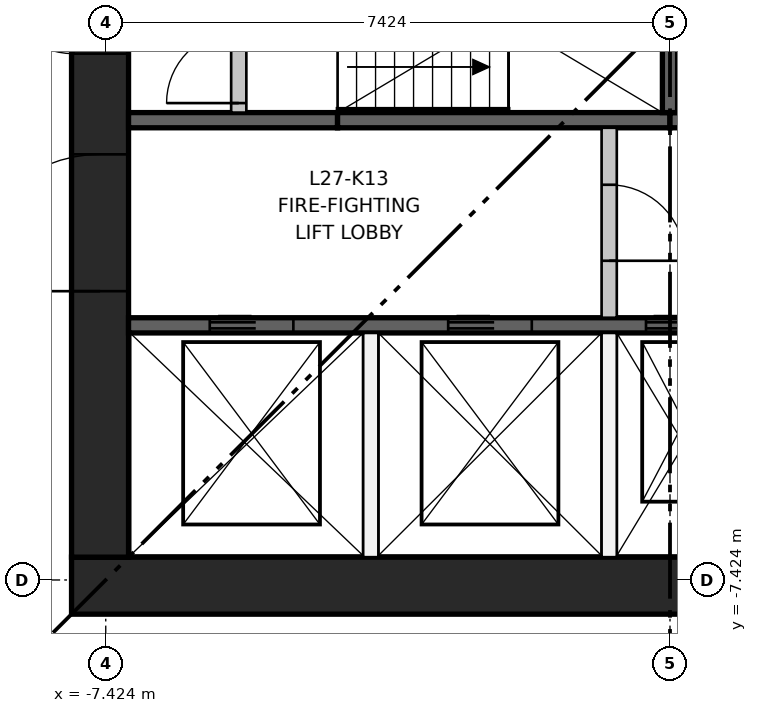
"""IFC4 building model, lengths in metres.
Left out: names, types, materials, properties, quantities, classifications, styles, units other than length and angle.
Written with IfcOpenShell. Run it as: python <this file> out.ifc"""

import sys

from ifc_helpers import new_model, si_unit, direction, frame, frame_2d, origin, place, context, subcontext, project, spatial, rectangle, extrude, element, fill, save


model = new_model("IFC4")
c1 = context("Model", 3, precision=1e-05, world=origin(), true_north=direction((0.0, 1.0)))
c2 = subcontext(c1, "Body", "Model", "MODEL_VIEW")
j1 = project(units=[si_unit("LENGTHUNIT", "METRE"), si_unit("PLANEANGLEUNIT", "RADIAN")], contexts=[c1])
p1 = place(None, origin())
s1 = spatial("IfcSite", under=j1, at=p1, CompositionType="ELEMENT")
p2 = place(p1, origin())
s2 = spatial("IfcBuilding", under=s1, at=p2, CompositionType="ELEMENT")
p3 = place(p2, frame((0.0, 0.0, 105.6)))
s3 = spatial("IfcBuildingStorey", under=s2, at=p3, CompositionType="ELEMENT", Elevation=105.6)
p4 = place(p3, frame((-7.874, -7.499, 0.0), z_axis=(0.0, 0.0, 1.0), x_axis=(1.0, 0.0, 0.0)))
e1 = element("IfcWall", 1, at=p4, inside=s3, PredefinedType="SHEAR", context=c2, shape_type="SweptSolid", body=[
    extrude(rectangle(XDim=15.748, YDim=0.75, at=frame_2d((7.874, 0.0))), origin(), (0.0, 0.0, 1.0), 3.65),
])
p5 = place(p3, frame((-7.499, -7.124, 0.0), z_axis=(0.0, 0.0, 1.0), x_axis=(0.0, 1.0, 0.0)))
e2 = element("IfcWall", 2, at=p5, inside=s3, PredefinedType="SHEAR", context=c2, shape_type="SweptSolid", body=[
    extrude(rectangle(XDim=14.248, YDim=0.75, at=frame_2d((7.124, 0.0))), origin(), (0.0, 0.0, 1.0), 3.65),
])
p6 = place(p5, frame((6.624, 0.0, 0.0)))
e3 = element("IfcOpeningElement", 3, at=p6, cuts=e2, PredefinedType="OPENING", context=c2, shape_type="SweptSolid", body=[
    extrude(rectangle(XDim=1.0, YDim=2.1, at=frame_2d((0.5, 1.05))), frame((0.0, 0.385, 0.0), z_axis=(0.0, -1.0, 0.0), x_axis=(1.0, 0.0, 0.0)), (0.0, 0.0, 1.0), 0.77),
])
p7 = place(p5, frame((3.5, 0.0, 0.0)))
e4 = element("IfcOpeningElement", 4, at=p7, cuts=e2, PredefinedType="OPENING", context=c2, shape_type="SweptSolid", body=[
    extrude(rectangle(XDim=1.8, YDim=2.1, at=frame_2d((0.9, 1.05))), frame((0.0, 0.385, 0.0), z_axis=(0.0, -1.0, 0.0), x_axis=(1.0, 0.0, 0.0)), (0.0, 0.0, 1.0), 0.77),
])
p8 = place(p5, frame((8.948, 0.0, 0.0)))
e5 = element("IfcOpeningElement", 5, at=p8, cuts=e2, PredefinedType="OPENING", context=c2, shape_type="SweptSolid", body=[
    extrude(rectangle(XDim=1.8, YDim=2.1, at=frame_2d((0.9, 1.05))), frame((0.0, 0.385, 0.0), z_axis=(0.0, -1.0, 0.0), x_axis=(1.0, 0.0, 0.0)), (0.0, 0.0, 1.0), 0.77),
])
p9 = place(p5, frame((12.124, 0.0, 0.0)))
e6 = element("IfcOpeningElement", 6, at=p9, cuts=e2, PredefinedType="OPENING", context=c2, shape_type="SweptSolid", body=[
    extrude(rectangle(XDim=1.0, YDim=2.1, at=frame_2d((0.5, 1.05))), frame((0.0, 0.385, 0.0), z_axis=(0.0, -1.0, 0.0), x_axis=(1.0, 0.0, 0.0)), (0.0, 0.0, 1.0), 0.77),
])
p10 = place(p3, frame((-7.124, -4.074, 0.0), z_axis=(0.0, 0.0, 1.0), x_axis=(1.0, 0.0, 0.0)))
e7 = element("IfcWall", 7, at=p10, inside=s3, PredefinedType="SHEAR", context=c2, shape_type="SweptSolid", body=[
    extrude(rectangle(XDim=14.248, YDim=0.2, at=frame_2d((7.124, 0.0))), origin(), (0.0, 0.0, 1.0), 3.3),
])
p11 = place(p10, frame((1.069, 0.0, 0.0)))
e8 = element("IfcOpeningElement", 8, at=p11, cuts=e7, PredefinedType="OPENING", context=c2, shape_type="SweptSolid", body=[
    extrude(rectangle(XDim=1.1, YDim=2.1, at=frame_2d((0.55, 1.05))), frame((0.0, 0.11, 0.0), z_axis=(0.0, -1.0, 0.0), x_axis=(1.0, 0.0, 0.0)), (0.0, 0.0, 1.0), 0.22),
])
p12 = place(p10, frame((4.206, 0.0, 0.0)))
e9 = element("IfcOpeningElement", 9, at=p12, cuts=e7, PredefinedType="OPENING", context=c2, shape_type="SweptSolid", body=[
    extrude(rectangle(XDim=1.1, YDim=2.1, at=frame_2d((0.55, 1.05))), frame((0.0, 0.11, 0.0), z_axis=(0.0, -1.0, 0.0), x_axis=(1.0, 0.0, 0.0)), (0.0, 0.0, 1.0), 0.22),
])
p13 = place(p10, frame((6.808, 0.0, 0.0)))
e10 = element("IfcOpeningElement", 10, at=p13, cuts=e7, PredefinedType="OPENING", context=c2, shape_type="SweptSolid", body=[
    extrude(rectangle(XDim=1.0, YDim=2.1, at=frame_2d((0.5, 1.05))), frame((0.0, 0.11, 0.0), z_axis=(0.0, -1.0, 0.0), x_axis=(1.0, 0.0, 0.0)), (0.0, 0.0, 1.0), 0.22),
])
p14 = place(p10, frame((8.777, 0.0, 0.0)))
e11 = element("IfcOpeningElement", 11, at=p14, cuts=e7, PredefinedType="OPENING", context=c2, shape_type="SweptSolid", body=[
    extrude(rectangle(XDim=1.0, YDim=2.1, at=frame_2d((0.5, 1.05))), frame((0.0, 0.11, 0.0), z_axis=(0.0, -1.0, 0.0), x_axis=(1.0, 0.0, 0.0)), (0.0, 0.0, 1.0), 0.22),
])
p15 = place(p10, frame((10.745, 0.0, 0.0)))
e12 = element("IfcOpeningElement", 12, at=p15, cuts=e7, PredefinedType="OPENING", context=c2, shape_type="SweptSolid", body=[
    extrude(rectangle(XDim=1.0, YDim=2.1, at=frame_2d((0.5, 1.05))), frame((0.0, 0.11, 0.0), z_axis=(0.0, -1.0, 0.0), x_axis=(1.0, 0.0, 0.0)), (0.0, 0.0, 1.0), 0.22),
])
p16 = place(p10, frame((12.714, 0.0, 0.0)))
e13 = element("IfcOpeningElement", 13, at=p16, cuts=e7, PredefinedType="OPENING", context=c2, shape_type="SweptSolid", body=[
    extrude(rectangle(XDim=1.0, YDim=2.1, at=frame_2d((0.5, 1.05))), frame((0.0, 0.11, 0.0), z_axis=(0.0, -1.0, 0.0), x_axis=(1.0, 0.0, 0.0)), (0.0, 0.0, 1.0), 0.22),
])
p17 = place(p3, frame((-7.124, -1.375, 0.0), z_axis=(0.0, 0.0, 1.0), x_axis=(1.0, 0.0, 0.0)))
e14 = element("IfcWall", 14, at=p17, inside=s3, PredefinedType="SHEAR", context=c2, shape_type="SweptSolid", body=[
    extrude(rectangle(XDim=2.75, YDim=0.2, at=frame_2d((1.375, 0.0))), origin(), (0.0, 0.0, 1.0), 3.3),
])
for number, where, z_axis, x_axis in (
    (15, (-4.374, -1.375, 0.0), (0.0, 0.0, 1.0), (1.0, 0.0, 0.0)),
    (16, (0.0, -1.375, 0.0), (0.0, 0.0, 1.0), (1.0, 0.0, 0.0)),
):
    element("IfcWall", number, at=place(p3, frame(where, z_axis=z_axis, x_axis=x_axis)), inside=s3, PredefinedType="SHEAR", context=c2, shape_type="SweptSolid", body=[
        extrude(rectangle(XDim=4.374, YDim=0.2, at=frame_2d((2.187, 0.0))), origin(), (0.0, 0.0, 1.0), 3.3),
    ])
p18 = place(p3, frame((0.0, -1.275, 0.0), z_axis=(0.0, 0.0, 1.0), x_axis=(0.0, 1.0, 0.0)))
e17 = element("IfcWall", 17, at=p18, inside=s3, PredefinedType="SHEAR", context=c2, shape_type="SweptSolid", body=[
    extrude(rectangle(XDim=2.55, YDim=0.2, at=frame_2d((1.275, 0.0))), origin(), (0.0, 0.0, 1.0), 3.3),
])
for number, where, z_axis, x_axis in (
    (18, (-3.937, -7.124, 0.0), (0.0, 0.0, 1.0), (0.0, 1.0, 0.0)),
    (19, (-0.8, -7.124, 0.0), (0.0, 0.0, 1.0), (0.0, 1.0, 0.0)),
):
    element("IfcWall", number, at=place(p3, frame(where, z_axis=z_axis, x_axis=x_axis)), inside=s3, PredefinedType="PARTITIONING", context=c2, shape_type="SweptSolid", body=[
        extrude(rectangle(XDim=2.95, YDim=0.2, at=frame_2d((1.475, 0.0))), origin(), (0.0, 0.0, 1.0), 3.3),
    ])
p19 = place(p3, frame((-0.8, -3.974, 0.0), z_axis=(0.0, 0.0, 1.0), x_axis=(0.0, 1.0, 0.0)))
e20 = element("IfcWall", 20, at=p19, inside=s3, PredefinedType="PARTITIONING", context=c2, shape_type="SweptSolid", body=[
    extrude(rectangle(XDim=2.499, YDim=0.2, at=frame_2d((1.25, 0.0))), origin(), (0.0, 0.0, 1.0), 3.3),
])
p20 = place(p19, frame((0.75, 0.0, 0.0)))
e21 = element("IfcOpeningElement", 21, at=p20, cuts=e20, PredefinedType="OPENING", context=c2, shape_type="SweptSolid", body=[
    extrude(rectangle(XDim=1.0, YDim=2.1, at=frame_2d((0.5, 1.05))), frame((0.0, 0.11, 0.0), z_axis=(0.0, -1.0, 0.0), x_axis=(1.0, 0.0, 0.0)), (0.0, 0.0, 1.0), 0.22),
])
p21 = place(p3, frame((-5.674, -1.275, 0.0), z_axis=(0.0, 0.0, 1.0), x_axis=(0.0, 1.0, 0.0)))
e22 = element("IfcWall", 22, at=p21, inside=s3, PredefinedType="PARTITIONING", context=c2, shape_type="SweptSolid", body=[
    extrude(rectangle(XDim=2.55, YDim=0.2, at=frame_2d((1.275, 0.0))), origin(), (0.0, 0.0, 1.0), 3.3),
])
p22 = place(p21, frame((0.125, 0.0, 0.0)))
e23 = element("IfcOpeningElement", 23, at=p22, cuts=e22, PredefinedType="OPENING", context=c2, shape_type="SweptSolid", body=[
    extrude(rectangle(XDim=0.95, YDim=2.1, at=frame_2d((0.475, 1.05))), frame((0.0, 0.11, 0.0), z_axis=(0.0, -1.0, 0.0), x_axis=(1.0, 0.0, 0.0)), (0.0, 0.0, 1.0), 0.22),
])
p23 = place(p21, frame((1.475, 0.0, 0.0)))
e24 = element("IfcOpeningElement", 24, at=p23, cuts=e22, PredefinedType="OPENING", context=c2, shape_type="SweptSolid", body=[
    extrude(rectangle(XDim=0.95, YDim=2.1, at=frame_2d((0.475, 1.05))), frame((0.0, 0.11, 0.0), z_axis=(0.0, -1.0, 0.0), x_axis=(1.0, 0.0, 0.0)), (0.0, 0.0, 1.0), 0.22),
])
p24 = place(p11, origin())
e25 = element("IfcDoor", 25, at=p24, inside=s3, OperationType="DOUBLE_DOOR_SLIDING", PredefinedType="DOOR", context=c2, shape_type="SweptSolid", body=[
    extrude(rectangle(XDim=1.1, YDim=2.1, at=frame_2d((0.55, 1.05))), frame((0.0, 0.025, 0.0), z_axis=(0.0, -1.0, 0.0), x_axis=(1.0, 0.0, 0.0)), (0.0, 0.0, 1.0), 0.05),
])
fill(e8, e25)
p25 = place(p12, origin())
e26 = element("IfcDoor", 26, at=p25, inside=s3, OperationType="DOUBLE_DOOR_SLIDING", PredefinedType="DOOR", context=c2, shape_type="SweptSolid", body=[
    extrude(rectangle(XDim=1.1, YDim=2.1, at=frame_2d((0.55, 1.05))), frame((0.0, 0.025, 0.0), z_axis=(0.0, -1.0, 0.0), x_axis=(1.0, 0.0, 0.0)), (0.0, 0.0, 1.0), 0.05),
])
fill(e9, e26)
p26 = place(p13, origin())
e27 = element("IfcDoor", 27, at=p26, inside=s3, OperationType="DOUBLE_DOOR_SLIDING", PredefinedType="DOOR", context=c2, shape_type="SweptSolid", body=[
    extrude(rectangle(XDim=1.0, YDim=2.1, at=frame_2d((0.5, 1.05))), frame((0.0, 0.025, 0.0), z_axis=(0.0, -1.0, 0.0), x_axis=(1.0, 0.0, 0.0)), (0.0, 0.0, 1.0), 0.05),
])
fill(e10, e27)
p27 = place(p22, origin())
e28 = element("IfcDoor", 28, at=p27, inside=s3, OperationType="SINGLE_SWING_LEFT", PredefinedType="DOOR", context=c2, shape_type="SweptSolid", body=[
    extrude(rectangle(XDim=0.95, YDim=2.1, at=frame_2d((0.475, 1.05))), frame((0.0, 0.025, 0.0), z_axis=(0.0, -1.0, 0.0), x_axis=(1.0, 0.0, 0.0)), (0.0, 0.0, 1.0), 0.05),
])
fill(e23, e28)
p28 = place(p20, frame((1.0, 0.0, 0.0), z_axis=(0.0, 0.0, 1.0), x_axis=(-1.0, 0.0, 0.0)))
e29 = element("IfcDoor", 29, at=p28, inside=s3, OperationType="SINGLE_SWING_LEFT", PredefinedType="DOOR", context=c2, shape_type="SweptSolid", body=[
    extrude(rectangle(XDim=1.0, YDim=2.1, at=frame_2d((0.5, 1.05))), frame((0.0, 0.025, 0.0), z_axis=(0.0, -1.0, 0.0), x_axis=(1.0, 0.0, 0.0)), (0.0, 0.0, 1.0), 0.05),
])
fill(e21, e29)
p29 = place(p6, origin())
e30 = element("IfcDoor", 30, at=p29, inside=s3, OperationType="SINGLE_SWING_RIGHT", PredefinedType="DOOR", context=c2, shape_type="SweptSolid", body=[
    extrude(rectangle(XDim=1.0, YDim=2.1, at=frame_2d((0.5, 1.05))), frame((0.0, 0.375, 0.0), z_axis=(0.0, -1.0, 0.0), x_axis=(1.0, 0.0, 0.0)), (0.0, 0.0, 1.0), 0.05),
])
fill(e3, e30)
p30 = place(p7, origin())
e31 = element("IfcDoor", 31, at=p30, inside=s3, OperationType="DOUBLE_DOOR_SINGLE_SWING", PredefinedType="DOOR", context=c2, shape_type="SweptSolid", body=[
    extrude(rectangle(XDim=1.8, YDim=2.1, at=frame_2d((0.9, 1.05))), frame((0.0, 0.025, 0.0), z_axis=(0.0, -1.0, 0.0), x_axis=(1.0, 0.0, 0.0)), (0.0, 0.0, 1.0), 0.05),
])
fill(e4, e31)
save(model, sys.argv[1])
